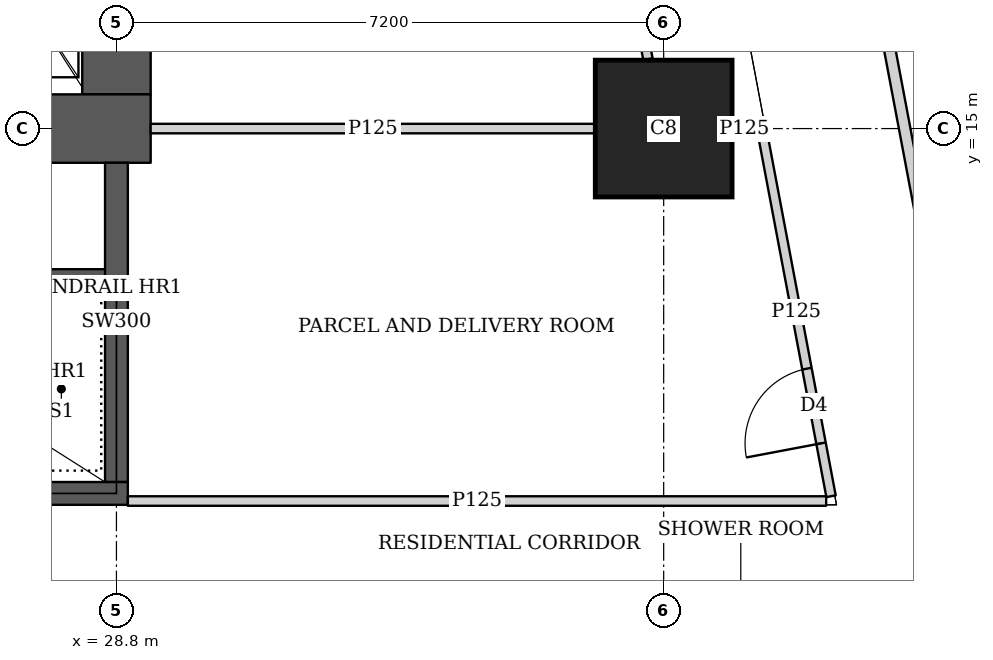
"""IFC4 building model, lengths in metres.
Left out: names, types, materials, properties, quantities, classifications, styles, units other than length and angle.
Written with IfcOpenShell. Run it as: python <this file> out.ifc"""

import sys

from ifc_helpers import new_model, si_unit, direction, frame, frame_2d, origin, origin_2d, place, context, subcontext, project, spatial, rectangle, extrude, element, fill, save


model = new_model("IFC4")
c1 = context("Model", 3, precision=1e-05, world=origin(), true_north=direction((0.0, 1.0)))
c2 = subcontext(c1, "Body", "Model", "MODEL_VIEW")
j1 = project(units=[si_unit("LENGTHUNIT", "METRE"), si_unit("PLANEANGLEUNIT", "RADIAN")], contexts=[c1])
p1 = place(None, origin())
s1 = spatial("IfcSite", under=j1, at=p1, CompositionType="ELEMENT")
p2 = place(p1, origin())
s2 = spatial("IfcBuilding", under=s1, at=p2, CompositionType="ELEMENT")
p3 = place(p2, frame((0.0, 0.0, 53.75)))
s3 = spatial("IfcBuildingStorey", under=s2, at=p3, CompositionType="ELEMENT", Elevation=53.75)
p4 = place(p3, frame((36.0, 15.0, 0.0), z_axis=(0.0, 0.0, 1.0), x_axis=(1.0, 0.0, 0.0)))
e1 = element("IfcColumn", 1, at=p4, inside=s3, PredefinedType="COLUMN", context=c2, shape_type="SweptSolid", body=[
    extrude(rectangle(XDim=1.8, YDim=1.8, at=origin_2d()), origin(), (0.0, 0.0, 1.0), 3.75),
])
p5 = place(p3, frame((13.95, 15.0, 0.0), z_axis=(0.0, 0.0, 1.0), x_axis=(1.0, 0.0, 0.0)))
e2 = element("IfcWall", 2, at=p5, inside=s3, PredefinedType="SHEAR", context=c2, shape_type="SweptSolid", body=[
    extrude(rectangle(XDim=15.3, YDim=0.9, at=frame_2d((7.65, 0.0))), origin(), (0.0, 0.0, 1.0), 3.75),
])
p6 = place(p5, frame((4.45, 0.0, 0.0)))
e3 = element("IfcOpeningElement", 3, at=p6, cuts=e2, PredefinedType="OPENING", context=c2, shape_type="SweptSolid", body=[
    extrude(rectangle(XDim=1.8, YDim=2.1, at=frame_2d((0.9, 1.05))), frame((0.0, 0.46, 0.0), z_axis=(0.0, -1.0, 0.0), x_axis=(1.0, 0.0, 0.0)), (0.0, 0.0, 1.0), 0.92),
])
p7 = place(p5, frame((10.7, 0.0, 0.0)))
e4 = element("IfcOpeningElement", 4, at=p7, cuts=e2, PredefinedType="OPENING", context=c2, shape_type="SweptSolid", body=[
    extrude(rectangle(XDim=1.1, YDim=2.1, at=frame_2d((0.55, 1.05))), frame((0.0, 0.46, 0.0), z_axis=(0.0, -1.0, 0.0), x_axis=(1.0, 0.0, 0.0)), (0.0, 0.0, 1.0), 0.92),
])
p8 = place(p3, frame((28.8, 15.45, 0.0), z_axis=(0.0, 0.0, 1.0), x_axis=(0.0, 1.0, 0.0)))
e5 = element("IfcWall", 5, at=p8, inside=s3, PredefinedType="SHEAR", context=c2, shape_type="SweptSolid", body=[
    extrude(rectangle(XDim=14.1, YDim=0.9, at=frame_2d((7.05, 0.0))), origin(), (0.0, 0.0, 1.0), 3.75),
])
p9 = place(p3, frame((21.45, 10.2, 0.0), z_axis=(0.0, 0.0, 1.0), x_axis=(1.0, 0.0, 0.0)))
e6 = element("IfcWall", 6, at=p9, inside=s3, PredefinedType="SHEAR", context=c2, shape_type="SweptSolid", body=[
    extrude(rectangle(XDim=7.5, YDim=0.3, at=frame_2d((3.75, 0.0))), origin(), (0.0, 0.0, 1.0), 3.75),
])
p10 = place(p9, frame((0.5, 0.0, 0.0)))
e7 = element("IfcOpeningElement", 7, at=p10, cuts=e6, PredefinedType="OPENING", context=c2, shape_type="SweptSolid", body=[
    extrude(rectangle(XDim=1.1, YDim=2.1, at=frame_2d((0.55, 1.05))), frame((0.0, 0.16, 0.0), z_axis=(0.0, -1.0, 0.0), x_axis=(1.0, 0.0, 0.0)), (0.0, 0.0, 1.0), 0.32),
])
p11 = place(p3, frame((28.8, 10.35, 0.0), z_axis=(0.0, 0.0, 1.0), x_axis=(0.0, 1.0, 0.0)))
e8 = element("IfcWall", 8, at=p11, inside=s3, PredefinedType="SHEAR", context=c2, shape_type="SweptSolid", body=[
    extrude(rectangle(XDim=4.2, YDim=0.3, at=frame_2d((2.1, 0.0))), origin(), (0.0, 0.0, 1.0), 3.75),
])
p12 = place(p3, frame((35.094, 36.585, 0.0), z_axis=(0.0, 0.0, 1.0), x_axis=(0.185588860311, -0.982627485331, 0.0)))
e9 = element("IfcWall", 9, at=p12, inside=s3, PredefinedType="SOLIDWALL", context=c2, shape_type="SweptSolid", body=[
    extrude(rectangle(XDim=34.797, YDim=0.15, at=frame_2d((17.399, 0.0))), origin(), (0.0, 0.0, 1.0), 2.5),
])
p13 = place(p12, frame((9.828, 0.0, 0.0)))
e10 = element("IfcOpeningElement", 10, at=p13, cuts=e9, PredefinedType="OPENING", context=c2, shape_type="SweptSolid", body=[
    extrude(rectangle(XDim=1.0, YDim=2.1, at=frame_2d((0.5, 1.05))), frame((0.0, 0.085, 0.0), z_axis=(0.0, -1.0, 0.0), x_axis=(1.0, 0.0, 0.0)), (0.0, 0.0, 1.0), 0.17),
])
p14 = place(p12, frame((13.645, 0.0, 0.0)))
e11 = element("IfcOpeningElement", 11, at=p14, cuts=e9, PredefinedType="OPENING", context=c2, shape_type="SweptSolid", body=[
    extrude(rectangle(XDim=1.0, YDim=2.1, at=frame_2d((0.5, 1.05))), frame((0.0, 0.085, 0.0), z_axis=(0.0, -1.0, 0.0), x_axis=(1.0, 0.0, 0.0)), (0.0, 0.0, 1.0), 0.17),
])
p15 = place(p12, frame((25.9, 0.0, 0.0)))
e12 = element("IfcOpeningElement", 12, at=p15, cuts=e9, PredefinedType="OPENING", context=c2, shape_type="SweptSolid", body=[
    extrude(rectangle(XDim=1.0, YDim=2.1, at=frame_2d((0.5, 1.05))), frame((0.0, 0.085, 0.0), z_axis=(0.0, -1.0, 0.0), x_axis=(1.0, 0.0, 0.0)), (0.0, 0.0, 1.0), 0.17),
])
p16 = place(p3, frame((28.95, 10.1, 0.0), z_axis=(0.0, 0.0, 1.0), x_axis=(1.0, 0.0, 0.0)))
e13 = element("IfcWall", 13, at=p16, inside=s3, PredefinedType="PARTITIONING", context=c2, shape_type="SweptSolid", body=[
    extrude(rectangle(XDim=9.188, YDim=0.125, at=frame_2d((4.594, 0.0))), origin(), (0.0, 0.0, 1.0), 3.5),
])
p17 = place(p3, frame((38.202, 10.163, 0.0), z_axis=(0.0, 0.0, 1.0), x_axis=(-0.185641892853, 0.982617467593, 0.0)))
e14 = element("IfcWall", 14, at=p17, inside=s3, PredefinedType="PARTITIONING", context=c2, shape_type="SweptSolid", body=[
    extrude(rectangle(XDim=4.922, YDim=0.125, at=frame_2d((2.461, 0.0))), origin(), (0.0, 0.0, 1.0), 3.5),
])
p18 = place(p17, frame((0.708, 0.0, 0.0)))
e15 = element("IfcOpeningElement", 15, at=p18, cuts=e14, PredefinedType="OPENING", context=c2, shape_type="SweptSolid", body=[
    extrude(rectangle(XDim=1.0, YDim=2.1, at=frame_2d((0.5, 1.05))), frame((0.0, 0.073, 0.0), z_axis=(0.0, -1.0, 0.0), x_axis=(1.0, 0.0, 0.0)), (0.0, 0.0, 1.0), 0.145),
])
p19 = place(p3, frame((35.793, 15.913, 0.0), z_axis=(0.0, 0.0, 1.0), x_axis=(-0.185651708232, 0.982615613162, 0.0)))
e16 = element("IfcWall", 16, at=p19, inside=s3, PredefinedType="PARTITIONING", context=c2, shape_type="SweptSolid", body=[
    extrude(rectangle(XDim=13.407, YDim=0.125, at=frame_2d((6.704, 0.0))), origin(), (0.0, 0.0, 1.0), 2.5),
])
p20 = place(p19, frame((4.9, 0.0, 0.0)))
e17 = element("IfcOpeningElement", 17, at=p20, cuts=e16, PredefinedType="OPENING", context=c2, shape_type="SweptSolid", body=[
    extrude(rectangle(XDim=1.0, YDim=2.1, at=frame_2d((0.5, 1.05))), frame((0.0, 0.073, 0.0), z_axis=(0.0, -1.0, 0.0), x_axis=(1.0, 0.0, 0.0)), (0.0, 0.0, 1.0), 0.145),
])
p21 = place(p3, frame((29.25, 15.0, 0.0), z_axis=(0.0, 0.0, 1.0), x_axis=(1.0, 0.0, 0.0)))
e18 = element("IfcWall", 18, at=p21, inside=s3, PredefinedType="PARTITIONING", context=c2, shape_type="SweptSolid", body=[
    extrude(rectangle(XDim=5.849, YDim=0.125, at=frame_2d((2.925, 0.0))), origin(), (0.0, 0.0, 1.0), 3.5),
])
p22 = place(p3, frame((36.901, 15.0, 0.0), z_axis=(0.0, 0.0, 1.0), x_axis=(1.0, 0.0, 0.0)))
e19 = element("IfcWall", 19, at=p22, inside=s3, PredefinedType="PARTITIONING", context=c2, shape_type="SweptSolid", body=[
    extrude(rectangle(XDim=0.326, YDim=0.125, at=frame_2d((0.163, 0.0))), origin(), (0.0, 0.0, 1.0), 3.5),
])
p23 = place(p3, frame((23.0, 13.05, 0.0), z_axis=(0.0, 0.0, 1.0), x_axis=(1.0, 0.0, 0.0)))
e20 = element("IfcWall", 20, at=p23, inside=s3, PredefinedType="SHEAR", context=c2, shape_type="SweptSolid", body=[
    extrude(rectangle(XDim=5.8, YDim=0.2, at=frame_2d((2.9, 0.0))), origin(), (0.0, 0.0, 1.0), 3.75),
])
p24 = place(p18, origin())
e21 = element("IfcDoor", 21, at=p24, inside=s3, OperationType="SINGLE_SWING_LEFT", PredefinedType="DOOR", context=c2, shape_type="SweptSolid", body=[
    extrude(rectangle(XDim=1.0, YDim=2.1, at=frame_2d((0.5, 1.05))), frame((0.0, 0.025, 0.0), z_axis=(0.0, -1.0, 0.0), x_axis=(1.0, 0.0, 0.0)), (0.0, 0.0, 1.0), 0.05),
])
fill(e15, e21)
save(model, sys.argv[1])
